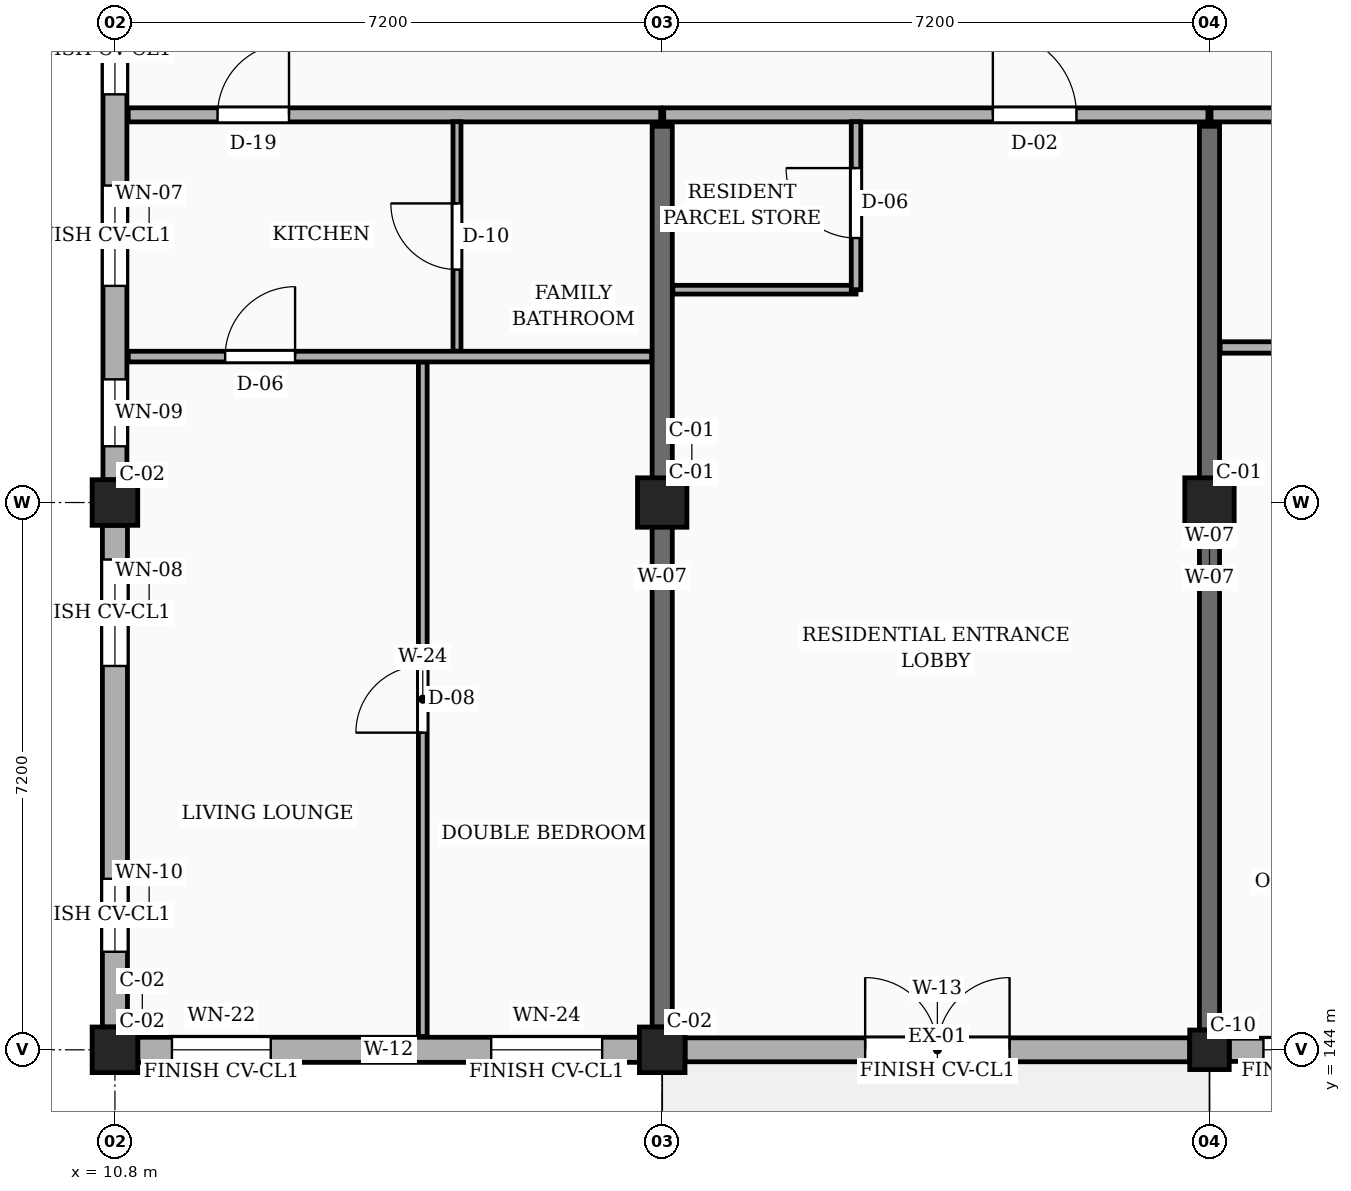
"""IFC4 building model, lengths in metres.
Left out: names, types, materials, properties, quantities, classifications, styles, units other than length and angle.
Written with IfcOpenShell. Run it as: python <this file> out.ifc"""

import sys

from ifc_helpers import new_model, si_unit, direction, frame, frame_2d, origin, origin_2d, place, context, subcontext, project, spatial, rectangle, circle, extrude, element, fill, save


model = new_model("IFC4")
c1 = context("Model", 3, precision=1e-05, world=origin(), true_north=direction((0.0, 1.0)))
c2 = subcontext(c1, "Body", "Model", "MODEL_VIEW")
j1 = project(units=[si_unit("LENGTHUNIT", "METRE"), si_unit("PLANEANGLEUNIT", "RADIAN")], contexts=[c1])
p1 = place(None, origin())
s1 = spatial("IfcSite", under=j1, at=p1, CompositionType="ELEMENT")
p2 = place(p1, origin())
s2 = spatial("IfcBuilding", under=s1, at=p2, CompositionType="ELEMENT")
p3 = place(p2, origin())
s3 = spatial("IfcBuildingStorey", under=s2, at=p3, CompositionType="ELEMENT", Elevation=0.0)
for number, where, z_axis, x_axis in (
    (1, (10.8, 144.0, 0.0), (0.0, 0.0, 1.0), (1.0, 0.0, 0.0)),
    (2, (10.8, 151.2, 0.0), (0.0, 0.0, 1.0), (1.0, 0.0, 0.0)),
    (3, (18.0, 144.0, 0.0), (0.0, 0.0, 1.0), (1.0, 0.0, 0.0)),
):
    element("IfcColumn", number, at=place(p3, frame(where, z_axis=z_axis, x_axis=x_axis)), inside=s3, PredefinedType="COLUMN", context=c2, shape_type="SweptSolid", body=[
        extrude(rectangle(XDim=0.6, YDim=0.6, at=origin_2d()), origin(), (0.0, 0.0, 1.0), 4.5),
    ])
p4 = place(p3, frame((18.0, 151.2, 0.0), z_axis=(0.0, 0.0, 1.0), x_axis=(1.0, 0.0, 0.0)))
e4 = element("IfcColumn", 4, at=p4, inside=s3, PredefinedType="COLUMN", context=c2, shape_type="SweptSolid", body=[
    extrude(rectangle(XDim=0.65, YDim=0.65, at=origin_2d()), origin(), (0.0, 0.0, 1.0), 4.5),
])
p5 = place(p3, frame((25.2, 144.0, 0.0), z_axis=(0.0, 0.0, 1.0), x_axis=(1.0, 0.0, 0.0)))
e5 = element("IfcColumn", 5, at=p5, inside=s3, PredefinedType="COLUMN", context=c2, shape_type="SweptSolid", body=[
    extrude(circle(Radius=0.26, at=origin_2d()), origin(), (0.0, 0.0, 1.0), 4.5),
])
p6 = place(p3, frame((25.2, 151.2, 0.0), z_axis=(0.0, 0.0, 1.0), x_axis=(1.0, 0.0, 0.0)))
e6 = element("IfcColumn", 6, at=p6, inside=s3, PredefinedType="COLUMN", context=c2, shape_type="SweptSolid", body=[
    extrude(rectangle(XDim=0.65, YDim=0.65, at=origin_2d()), origin(), (0.0, 0.0, 1.0), 4.5),
])
p7 = place(p3, frame((18.0, 144.3, 0.0), z_axis=(0.0, 0.0, 1.0), x_axis=(0.0, 1.0, 0.0)))
e7 = element("IfcWall", 7, at=p7, inside=s3, PredefinedType="SOLIDWALL", context=c2, shape_type="SweptSolid", body=[
    extrude(rectangle(XDim=11.85, YDim=0.265, at=frame_2d((5.925, 0.0))), origin(), (0.0, 0.0, 1.0), 3.535),
])
p8 = place(p3, frame((25.2, 144.26, 0.0), z_axis=(0.0, 0.0, 1.0), x_axis=(0.0, 1.0, 0.0)))
e8 = element("IfcWall", 8, at=p8, inside=s3, PredefinedType="SOLIDWALL", context=c2, shape_type="SweptSolid", body=[
    extrude(rectangle(XDim=11.89, YDim=0.265, at=frame_2d((5.945, 0.0))), origin(), (0.0, 0.0, 1.0), 3.535),
])
p9 = place(p3, frame((11.1, 144.0, 0.0), z_axis=(0.0, 0.0, 1.0), x_axis=(1.0, 0.0, 0.0)))
e9 = element("IfcWall", 9, at=p9, inside=s3, PredefinedType="SOLIDWALL", context=c2, shape_type="SweptSolid", body=[
    extrude(rectangle(XDim=6.6, YDim=0.33, at=frame_2d((3.3, 0.0))), origin(), (0.0, 0.0, 1.0), 3.805),
])
p10 = place(p9, frame((0.45, 0.0, 0.78)))
e10 = element("IfcOpeningElement", 10, at=p10, cuts=e9, PredefinedType="OPENING", context=c2, shape_type="SweptSolid", body=[
    extrude(rectangle(XDim=1.3, YDim=1.36, at=frame_2d((0.65, 0.68))), frame((0.0, 0.175, 0.0), z_axis=(0.0, -1.0, 0.0), x_axis=(1.0, 0.0, 0.0)), (0.0, 0.0, 1.0), 0.35),
])
p11 = place(p9, frame((4.65, 0.0, 0.78)))
e11 = element("IfcOpeningElement", 11, at=p11, cuts=e9, PredefinedType="OPENING", context=c2, shape_type="SweptSolid", body=[
    extrude(rectangle(XDim=1.46, YDim=1.36, at=frame_2d((0.73, 0.68))), frame((0.0, 0.175, 0.0), z_axis=(0.0, -1.0, 0.0), x_axis=(1.0, 0.0, 0.0)), (0.0, 0.0, 1.0), 0.35),
])
p12 = place(p3, frame((18.3, 144.0, 0.0), z_axis=(0.0, 0.0, 1.0), x_axis=(1.0, 0.0, 0.0)))
e12 = element("IfcWall", 12, at=p12, inside=s3, PredefinedType="SOLIDWALL", context=c2, shape_type="SweptSolid", body=[
    extrude(rectangle(XDim=6.64, YDim=0.315, at=frame_2d((3.32, 0.0))), origin(), (0.0, 0.0, 1.0), 3.805),
])
p13 = place(p12, frame((2.37, 0.0, 0.0)))
e13 = element("IfcOpeningElement", 13, at=p13, cuts=e12, PredefinedType="OPENING", context=c2, shape_type="SweptSolid", body=[
    extrude(rectangle(XDim=1.9, YDim=2.2, at=frame_2d((0.95, 1.1))), frame((0.0, 0.167, 0.0), z_axis=(0.0, -1.0, 0.0), x_axis=(1.0, 0.0, 0.0)), (0.0, 0.0, 1.0), 0.335),
])
p14 = place(p3, frame((25.46, 144.0, 0.0), z_axis=(0.0, 0.0, 1.0), x_axis=(1.0, 0.0, 0.0)))
e14 = element("IfcWall", 14, at=p14, inside=s3, PredefinedType="SOLIDWALL", context=c2, shape_type="SweptSolid", body=[
    extrude(rectangle(XDim=6.64, YDim=0.305, at=frame_2d((3.32, 0.0))), origin(), (0.0, 0.0, 1.0), 3.805),
])
p15 = place(p14, frame((0.45, 0.0, 0.78)))
e15 = element("IfcOpeningElement", 15, at=p15, cuts=e14, PredefinedType="OPENING", context=c2, shape_type="SweptSolid", body=[
    extrude(rectangle(XDim=1.46, YDim=1.36, at=frame_2d((0.73, 0.68))), frame((0.0, 0.163, 0.0), z_axis=(0.0, -1.0, 0.0), x_axis=(1.0, 0.0, 0.0)), (0.0, 0.0, 1.0), 0.325),
])
p16 = place(p14, frame((4.65, 0.0, 0.78)))
e16 = element("IfcOpeningElement", 16, at=p16, cuts=e14, PredefinedType="OPENING", context=c2, shape_type="SweptSolid", body=[
    extrude(rectangle(XDim=1.05, YDim=1.44, at=frame_2d((0.525, 0.72))), frame((0.0, 0.163, 0.0), z_axis=(0.0, -1.0, 0.0), x_axis=(1.0, 0.0, 0.0)), (0.0, 0.0, 1.0), 0.325),
])
p17 = place(p3, frame((10.8, 158.14, 0.0), z_axis=(0.0, 0.0, 1.0), x_axis=(0.0, -1.0, 0.0)))
e17 = element("IfcWall", 17, at=p17, inside=s3, PredefinedType="SOLIDWALL", context=c2, shape_type="SweptSolid", body=[
    extrude(rectangle(XDim=6.64, YDim=0.315, at=frame_2d((3.32, 0.0))), origin(), (0.0, 0.0, 1.0), 3.805),
])
p18 = place(p17, frame((0.41, 0.0, 0.78)))
e18 = element("IfcOpeningElement", 18, at=p18, cuts=e17, PredefinedType="OPENING", context=c2, shape_type="SweptSolid", body=[
    extrude(rectangle(XDim=1.16, YDim=1.15, at=frame_2d((0.58, 0.575))), frame((0.0, 0.167, 0.0), z_axis=(0.0, -1.0, 0.0), x_axis=(1.0, 0.0, 0.0)), (0.0, 0.0, 1.0), 0.335),
])
p19 = place(p17, frame((2.77, 0.0, 0.78)))
e19 = element("IfcOpeningElement", 19, at=p19, cuts=e17, PredefinedType="OPENING", context=c2, shape_type="SweptSolid", body=[
    extrude(rectangle(XDim=1.32, YDim=1.15, at=frame_2d((0.66, 0.575))), frame((0.0, 0.167, 0.0), z_axis=(0.0, -1.0, 0.0), x_axis=(1.0, 0.0, 0.0)), (0.0, 0.0, 1.0), 0.335),
])
p20 = place(p17, frame((5.32, 0.0, 0.78)))
e20 = element("IfcOpeningElement", 20, at=p20, cuts=e17, PredefinedType="OPENING", context=c2, shape_type="SweptSolid", body=[
    extrude(rectangle(XDim=0.88, YDim=1.26, at=frame_2d((0.44, 0.63))), frame((0.0, 0.167, 0.0), z_axis=(0.0, -1.0, 0.0), x_axis=(1.0, 0.0, 0.0)), (0.0, 0.0, 1.0), 0.335),
])
p21 = place(p3, frame((10.8, 150.9, 0.0), z_axis=(0.0, 0.0, 1.0), x_axis=(0.0, -1.0, 0.0)))
e21 = element("IfcWall", 21, at=p21, inside=s3, PredefinedType="SOLIDWALL", context=c2, shape_type="SweptSolid", body=[
    extrude(rectangle(XDim=6.6, YDim=0.33, at=frame_2d((3.3, 0.0))), origin(), (0.0, 0.0, 1.0), 3.805),
])
p22 = place(p21, frame((0.45, 0.0, 0.78)))
e22 = element("IfcOpeningElement", 22, at=p22, cuts=e21, PredefinedType="OPENING", context=c2, shape_type="SweptSolid", body=[
    extrude(rectangle(XDim=1.4, YDim=1.15, at=frame_2d((0.7, 0.575))), frame((0.0, 0.175, 0.0), z_axis=(0.0, -1.0, 0.0), x_axis=(1.0, 0.0, 0.0)), (0.0, 0.0, 1.0), 0.35),
])
p23 = place(p21, frame((4.65, 0.0, 0.78)))
e23 = element("IfcOpeningElement", 23, at=p23, cuts=e21, PredefinedType="OPENING", context=c2, shape_type="SweptSolid", body=[
    extrude(rectangle(XDim=0.96, YDim=1.26, at=frame_2d((0.48, 0.63))), frame((0.0, 0.175, 0.0), z_axis=(0.0, -1.0, 0.0), x_axis=(1.0, 0.0, 0.0)), (0.0, 0.0, 1.0), 0.35),
])
p24 = place(p3, frame((10.975, 156.3, 0.0), z_axis=(0.0, 0.0, 1.0), x_axis=(1.0, 0.0, 0.0)))
e24 = element("IfcWall", 24, at=p24, inside=s3, PredefinedType="PARTITIONING", context=c2, shape_type="SweptSolid", body=[
    extrude(rectangle(XDim=7.005, YDim=0.185, at=frame_2d((3.502, 0.0))), origin(), (0.0, 0.0, 1.0), 3.67),
])
p25 = place(p24, frame((1.175, 0.0, 0.0)))
e25 = element("IfcOpeningElement", 25, at=p25, cuts=e24, PredefinedType="OPENING", context=c2, shape_type="SweptSolid", body=[
    extrude(rectangle(XDim=0.94, YDim=2.12, at=frame_2d((0.47, 1.06))), frame((0.0, 0.103, 0.0), z_axis=(0.0, -1.0, 0.0), x_axis=(1.0, 0.0, 0.0)), (0.0, 0.0, 1.0), 0.205),
])
p26 = place(p3, frame((18.02, 156.3, 0.0), z_axis=(0.0, 0.0, 1.0), x_axis=(1.0, 0.0, 0.0)))
e26 = element("IfcWall", 26, at=p26, inside=s3, PredefinedType="PARTITIONING", context=c2, shape_type="SweptSolid", body=[
    extrude(rectangle(XDim=7.16, YDim=0.185, at=frame_2d((3.58, 0.0))), origin(), (0.0, 0.0, 1.0), 3.67),
])
p27 = place(p26, frame((4.33, 0.0, 0.0)))
e27 = element("IfcOpeningElement", 27, at=p27, cuts=e26, PredefinedType="OPENING", context=c2, shape_type="SweptSolid", body=[
    extrude(rectangle(XDim=1.1, YDim=2.15, at=frame_2d((0.55, 1.075))), frame((0.0, 0.103, 0.0), z_axis=(0.0, -1.0, 0.0), x_axis=(1.0, 0.0, 0.0)), (0.0, 0.0, 1.0), 0.205),
])
p28 = place(p3, frame((25.22, 156.3, 0.0), z_axis=(0.0, 0.0, 1.0), x_axis=(1.0, 0.0, 0.0)))
e28 = element("IfcWall", 28, at=p28, inside=s3, PredefinedType="PARTITIONING", context=c2, shape_type="SweptSolid", body=[
    extrude(rectangle(XDim=7.16, YDim=0.185, at=frame_2d((3.58, 0.0))), origin(), (0.0, 0.0, 1.0), 3.67),
])
p29 = place(p28, frame((1.33, 0.0, 0.0)))
e29 = element("IfcOpeningElement", 29, at=p29, cuts=e28, PredefinedType="OPENING", context=c2, shape_type="SweptSolid", body=[
    extrude(rectangle(XDim=1.0, YDim=2.15, at=frame_2d((0.5, 1.075))), frame((0.0, 0.103, 0.0), z_axis=(0.0, -1.0, 0.0), x_axis=(1.0, 0.0, 0.0)), (0.0, 0.0, 1.0), 0.205),
])
p30 = place(p3, frame((14.85, 144.175, 0.0), z_axis=(0.0, 0.0, 1.0), x_axis=(0.0, 1.0, 0.0)))
e30 = element("IfcWall", 30, at=p30, inside=s3, PredefinedType="PARTITIONING", context=c2, shape_type="SweptSolid", body=[
    extrude(rectangle(XDim=8.875, YDim=0.115, at=frame_2d((4.438, 0.0))), origin(), (0.0, 0.0, 1.0), 3.67),
])
p31 = place(p30, frame((3.998, 0.0, 0.0)))
e31 = element("IfcOpeningElement", 31, at=p31, cuts=e30, PredefinedType="OPENING", context=c2, shape_type="SweptSolid", body=[
    extrude(rectangle(XDim=0.88, YDim=2.08, at=frame_2d((0.44, 1.04))), frame((0.0, 0.067, 0.0), z_axis=(0.0, -1.0, 0.0), x_axis=(1.0, 0.0, 0.0)), (0.0, 0.0, 1.0), 0.135),
])
p32 = place(p3, frame((15.3, 153.19, 0.0), z_axis=(0.0, 0.0, 1.0), x_axis=(0.0, 1.0, 0.0)))
e32 = element("IfcWall", 32, at=p32, inside=s3, PredefinedType="PARTITIONING", context=c2, shape_type="SweptSolid", body=[
    extrude(rectangle(XDim=3.02, YDim=0.105, at=frame_2d((1.51, 0.0))), origin(), (0.0, 0.0, 1.0), 3.67),
])
p33 = place(p32, frame((1.075, 0.0, 0.0)))
e33 = element("IfcOpeningElement", 33, at=p33, cuts=e32, PredefinedType="OPENING", context=c2, shape_type="SweptSolid", body=[
    extrude(rectangle(XDim=0.87, YDim=2.05, at=frame_2d((0.435, 1.025))), frame((0.0, 0.062, 0.0), z_axis=(0.0, -1.0, 0.0), x_axis=(1.0, 0.0, 0.0)), (0.0, 0.0, 1.0), 0.125),
])
p34 = place(p3, frame((10.975, 153.12, 0.0), z_axis=(0.0, 0.0, 1.0), x_axis=(1.0, 0.0, 0.0)))
e34 = element("IfcWall", 34, at=p34, inside=s3, PredefinedType="PARTITIONING", context=c2, shape_type="SweptSolid", body=[
    extrude(rectangle(XDim=6.885, YDim=0.14, at=frame_2d((3.442, 0.0))), origin(), (0.0, 0.0, 1.0), 3.67),
])
p35 = place(p34, frame((1.275, 0.0, 0.0)))
e35 = element("IfcOpeningElement", 35, at=p35, cuts=e34, PredefinedType="OPENING", context=c2, shape_type="SweptSolid", body=[
    extrude(rectangle(XDim=0.92, YDim=2.1, at=frame_2d((0.46, 1.05))), frame((0.0, 0.08, 0.0), z_axis=(0.0, -1.0, 0.0), x_axis=(1.0, 0.0, 0.0)), (0.0, 0.0, 1.0), 0.16),
])
p36 = place(p3, frame((18.14, 154.0, 0.0), z_axis=(0.0, 0.0, 1.0), x_axis=(1.0, 0.0, 0.0)))
e36 = element("IfcWall", 36, at=p36, inside=s3, PredefinedType="PARTITIONING", context=c2, shape_type="SweptSolid", body=[
    extrude(rectangle(XDim=2.41, YDim=0.115, at=frame_2d((1.205, 0.0))), origin(), (0.0, 0.0, 1.0), 3.67),
])
p37 = place(p3, frame((20.55, 154.0, 0.0), z_axis=(0.0, 0.0, 1.0), x_axis=(0.0, 1.0, 0.0)))
e37 = element("IfcWall", 37, at=p37, inside=s3, PredefinedType="PARTITIONING", context=c2, shape_type="SweptSolid", body=[
    extrude(rectangle(XDim=2.21, YDim=0.125, at=frame_2d((1.105, 0.0))), origin(), (0.0, 0.0, 1.0), 3.67),
])
p38 = place(p37, frame((0.68, 0.0, 0.0)))
e38 = element("IfcOpeningElement", 38, at=p38, cuts=e37, PredefinedType="OPENING", context=c2, shape_type="SweptSolid", body=[
    extrude(rectangle(XDim=0.92, YDim=2.1, at=frame_2d((0.46, 1.05))), frame((0.0, 0.073, 0.0), z_axis=(0.0, -1.0, 0.0), x_axis=(1.0, 0.0, 0.0)), (0.0, 0.0, 1.0), 0.145),
])
p39 = place(p3, frame((25.34, 153.24, 0.0), z_axis=(0.0, 0.0, 1.0), x_axis=(1.0, 0.0, 0.0)))
e39 = element("IfcWall", 39, at=p39, inside=s3, PredefinedType="PARTITIONING", context=c2, shape_type="SweptSolid", body=[
    extrude(rectangle(XDim=6.92, YDim=0.15, at=frame_2d((3.46, 0.0))), origin(), (0.0, 0.0, 1.0), 3.67),
])
p40 = place(p39, frame((1.31, 0.0, 0.0)))
e40 = element("IfcOpeningElement", 40, at=p40, cuts=e39, PredefinedType="OPENING", context=c2, shape_type="SweptSolid", body=[
    extrude(rectangle(XDim=0.92, YDim=2.1, at=frame_2d((0.46, 1.05))), frame((0.0, 0.085, 0.0), z_axis=(0.0, -1.0, 0.0), x_axis=(1.0, 0.0, 0.0)), (0.0, 0.0, 1.0), 0.17),
])
p41 = place(p10, origin())
e41 = element("IfcWindow", 41, at=p41, inside=s3, PartitioningType="SINGLE_PANEL", PredefinedType="WINDOW", context=c2, shape_type="SweptSolid", body=[
    extrude(rectangle(XDim=1.3, YDim=1.36, at=frame_2d((0.65, 0.68))), frame((0.0, 0.03, 0.0), z_axis=(0.0, -1.0, 0.0), x_axis=(1.0, 0.0, 0.0)), (0.0, 0.0, 1.0), 0.06),
])
fill(e10, e41)
p42 = place(p11, origin())
e42 = element("IfcWindow", 42, at=p42, inside=s3, PartitioningType="SINGLE_PANEL", PredefinedType="WINDOW", context=c2, shape_type="SweptSolid", body=[
    extrude(rectangle(XDim=1.46, YDim=1.36, at=frame_2d((0.73, 0.68))), frame((0.0, 0.03, 0.0), z_axis=(0.0, -1.0, 0.0), x_axis=(1.0, 0.0, 0.0)), (0.0, 0.0, 1.0), 0.06),
])
fill(e11, e42)
p43 = place(p13, frame((1.9, 0.0, 0.0), z_axis=(0.0, 0.0, 1.0), x_axis=(-1.0, 0.0, 0.0)))
e43 = element("IfcDoor", 43, at=p43, inside=s3, OperationType="DOUBLE_DOOR_SINGLE_SWING", PredefinedType="DOOR", context=c2, shape_type="SweptSolid", body=[
    extrude(rectangle(XDim=1.9, YDim=2.2, at=frame_2d((0.95, 1.1))), frame((0.0, 0.025, 0.0), z_axis=(0.0, -1.0, 0.0), x_axis=(1.0, 0.0, 0.0)), (0.0, 0.0, 1.0), 0.05),
])
fill(e13, e43)
p44 = place(p15, origin())
e44 = element("IfcWindow", 44, at=p44, inside=s3, PartitioningType="SINGLE_PANEL", PredefinedType="WINDOW", context=c2, shape_type="SweptSolid", body=[
    extrude(rectangle(XDim=1.46, YDim=1.36, at=frame_2d((0.73, 0.68))), frame((0.0, 0.03, 0.0), z_axis=(0.0, -1.0, 0.0), x_axis=(1.0, 0.0, 0.0)), (0.0, 0.0, 1.0), 0.06),
])
fill(e15, e44)
p45 = place(p18, origin())
e45 = element("IfcWindow", 45, at=p45, inside=s3, PartitioningType="SINGLE_PANEL", PredefinedType="WINDOW", context=c2, shape_type="SweptSolid", body=[
    extrude(rectangle(XDim=1.16, YDim=1.15, at=frame_2d((0.58, 0.575))), frame((0.0, 0.03, 0.0), z_axis=(0.0, -1.0, 0.0), x_axis=(1.0, 0.0, 0.0)), (0.0, 0.0, 1.0), 0.06),
])
fill(e18, e45)
p46 = place(p19, origin())
e46 = element("IfcWindow", 46, at=p46, inside=s3, PartitioningType="SINGLE_PANEL", PredefinedType="WINDOW", context=c2, shape_type="SweptSolid", body=[
    extrude(rectangle(XDim=1.32, YDim=1.15, at=frame_2d((0.66, 0.575))), frame((0.0, 0.03, 0.0), z_axis=(0.0, -1.0, 0.0), x_axis=(1.0, 0.0, 0.0)), (0.0, 0.0, 1.0), 0.06),
])
fill(e19, e46)
p47 = place(p20, origin())
e47 = element("IfcWindow", 47, at=p47, inside=s3, PartitioningType="SINGLE_PANEL", PredefinedType="WINDOW", context=c2, shape_type="SweptSolid", body=[
    extrude(rectangle(XDim=0.88, YDim=1.26, at=frame_2d((0.44, 0.63))), frame((0.0, 0.03, 0.0), z_axis=(0.0, -1.0, 0.0), x_axis=(1.0, 0.0, 0.0)), (0.0, 0.0, 1.0), 0.06),
])
fill(e20, e47)
p48 = place(p22, origin())
e48 = element("IfcWindow", 48, at=p48, inside=s3, PartitioningType="SINGLE_PANEL", PredefinedType="WINDOW", context=c2, shape_type="SweptSolid", body=[
    extrude(rectangle(XDim=1.4, YDim=1.15, at=frame_2d((0.7, 0.575))), frame((0.0, 0.03, 0.0), z_axis=(0.0, -1.0, 0.0), x_axis=(1.0, 0.0, 0.0)), (0.0, 0.0, 1.0), 0.06),
])
fill(e22, e48)
p49 = place(p23, origin())
e49 = element("IfcWindow", 49, at=p49, inside=s3, PartitioningType="SINGLE_PANEL", PredefinedType="WINDOW", context=c2, shape_type="SweptSolid", body=[
    extrude(rectangle(XDim=0.96, YDim=1.26, at=frame_2d((0.48, 0.63))), frame((0.0, 0.03, 0.0), z_axis=(0.0, -1.0, 0.0), x_axis=(1.0, 0.0, 0.0)), (0.0, 0.0, 1.0), 0.06),
])
fill(e23, e49)
p50 = place(p25, origin())
e50 = element("IfcDoor", 50, at=p50, inside=s3, OperationType="SINGLE_SWING_RIGHT", PredefinedType="DOOR", context=c2, shape_type="SweptSolid", body=[
    extrude(rectangle(XDim=0.94, YDim=2.12, at=frame_2d((0.47, 1.06))), frame((0.0, 0.025, 0.0), z_axis=(0.0, -1.0, 0.0), x_axis=(1.0, 0.0, 0.0)), (0.0, 0.0, 1.0), 0.05),
])
fill(e25, e50)
p51 = place(p27, origin())
e51 = element("IfcDoor", 51, at=p51, inside=s3, OperationType="SINGLE_SWING_LEFT", PredefinedType="DOOR", context=c2, shape_type="SweptSolid", body=[
    extrude(rectangle(XDim=1.1, YDim=2.15, at=frame_2d((0.55, 1.075))), frame((0.0, 0.025, 0.0), z_axis=(0.0, -1.0, 0.0), x_axis=(1.0, 0.0, 0.0)), (0.0, 0.0, 1.0), 0.05),
])
fill(e27, e51)
p52 = place(p31, origin())
e52 = element("IfcDoor", 52, at=p52, inside=s3, OperationType="SINGLE_SWING_LEFT", PredefinedType="DOOR", context=c2, shape_type="SweptSolid", body=[
    extrude(rectangle(XDim=0.88, YDim=2.08, at=frame_2d((0.44, 1.04))), frame((0.0, 0.025, 0.0), z_axis=(0.0, -1.0, 0.0), x_axis=(1.0, 0.0, 0.0)), (0.0, 0.0, 1.0), 0.05),
])
fill(e31, e52)
p53 = place(p33, origin())
e53 = element("IfcDoor", 53, at=p53, inside=s3, OperationType="SINGLE_SWING_RIGHT", PredefinedType="DOOR", context=c2, shape_type="SweptSolid", body=[
    extrude(rectangle(XDim=0.87, YDim=2.05, at=frame_2d((0.435, 1.025))), frame((0.0, 0.025, 0.0), z_axis=(0.0, -1.0, 0.0), x_axis=(1.0, 0.0, 0.0)), (0.0, 0.0, 1.0), 0.05),
])
fill(e33, e53)
p54 = place(p35, origin())
e54 = element("IfcDoor", 54, at=p54, inside=s3, OperationType="SINGLE_SWING_RIGHT", PredefinedType="DOOR", context=c2, shape_type="SweptSolid", body=[
    extrude(rectangle(XDim=0.92, YDim=2.1, at=frame_2d((0.46, 1.05))), frame((0.0, 0.025, 0.0), z_axis=(0.0, -1.0, 0.0), x_axis=(1.0, 0.0, 0.0)), (0.0, 0.0, 1.0), 0.05),
])
fill(e35, e54)
p55 = place(p38, origin())
e55 = element("IfcDoor", 55, at=p55, inside=s3, OperationType="SINGLE_SWING_RIGHT", PredefinedType="DOOR", context=c2, shape_type="SweptSolid", body=[
    extrude(rectangle(XDim=0.92, YDim=2.1, at=frame_2d((0.46, 1.05))), frame((0.0, 0.025, 0.0), z_axis=(0.0, -1.0, 0.0), x_axis=(1.0, 0.0, 0.0)), (0.0, 0.0, 1.0), 0.05),
])
fill(e38, e55)
save(model, sys.argv[1])
